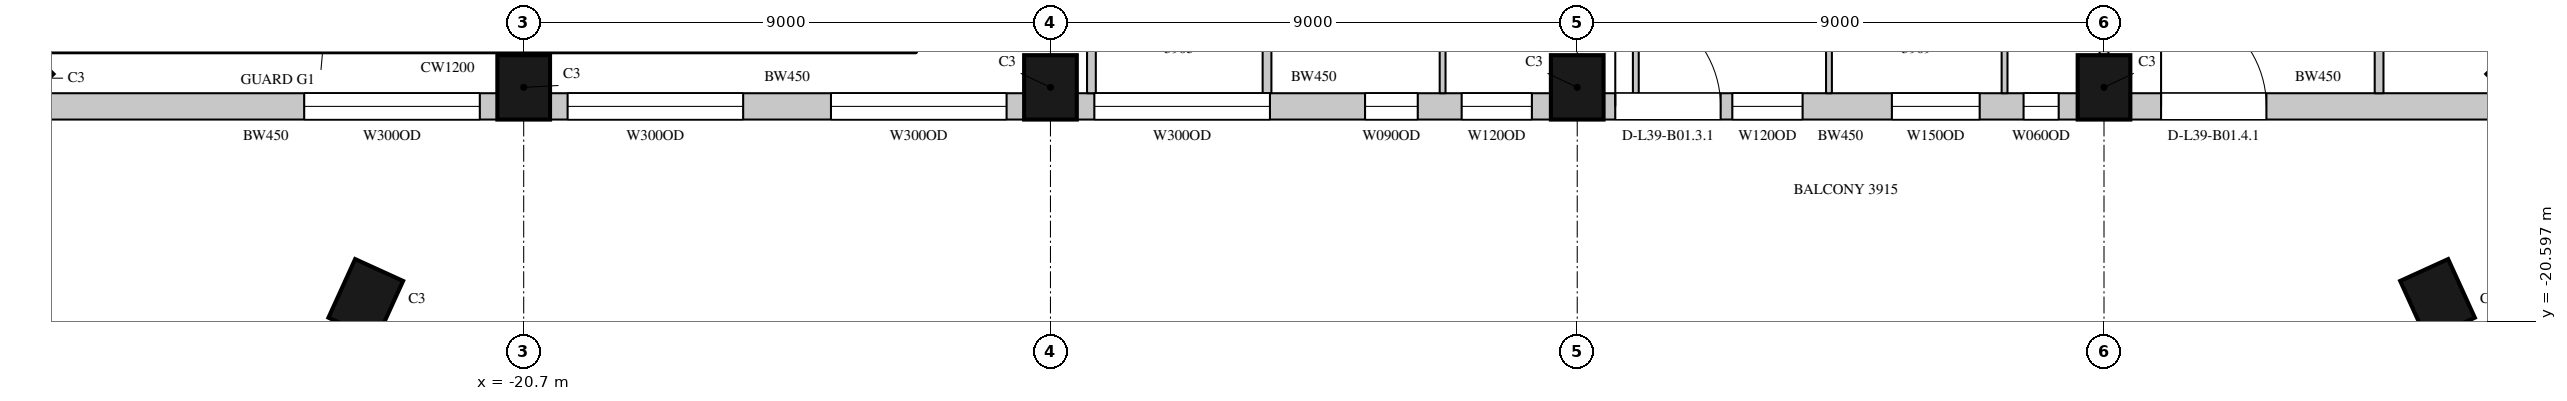
"""IFC4 building model, lengths in metres.
Left out: names, types, materials, properties, quantities, classifications, styles, units other than length and angle.
Written with IfcOpenShell. Run it as: python <this file> out.ifc"""

import sys

from ifc_helpers import new_model, si_unit, direction, frame, frame_2d, origin, origin_2d, place, context, subcontext, project, spatial, rectangle, extrude, element, fill, save


model = new_model("IFC4")
c1 = context("Model", 3, precision=1e-05, world=origin(), true_north=direction((0.0, 1.0)))
c2 = subcontext(c1, "Body", "Model", "MODEL_VIEW")
j1 = project(units=[si_unit("LENGTHUNIT", "METRE"), si_unit("PLANEANGLEUNIT", "RADIAN")], contexts=[c1])
p1 = place(None, origin())
s1 = spatial("IfcSite", under=j1, at=p1, CompositionType="ELEMENT")
p2 = place(p1, origin())
s2 = spatial("IfcBuilding", under=s1, at=p2, CompositionType="ELEMENT")
p3 = place(p2, frame((0.0, 0.0, 181.0)))
s3 = spatial("IfcBuildingStorey", under=s2, at=p3, CompositionType="ELEMENT", Elevation=181.0)
for number, where, z_axis, x_axis in (
    (1, (-29.443, -16.443, 0.0), (0.0, 0.0, 1.0), (0.707, -0.707, 0.0)),
    (2, (-20.7, -16.6, 0.0), (0.0, 0.0, 1.0), (1.0, 0.0, 0.0)),
    (3, (-11.7, -16.6, 0.0), (0.0, 0.0, 1.0), (1.0, 0.0, 0.0)),
    (4, (-2.7, -16.6, 0.0), (0.0, 0.0, 1.0), (1.0, 0.0, 0.0)),
    (5, (6.3, -16.6, 0.0), (0.0, 0.0, 1.0), (1.0, 0.0, 0.0)),
    (6, (13.543, -16.443, 0.0), (0.0, 0.0, 1.0), (0.707, 0.707, 0.0)),
    (7, (-23.398, -20.221, 0.0), (0.0, 0.0, 1.0), (0.91, -0.415, 0.0)),
    (8, (11.998, -20.221, 0.0), (0.0, 0.0, 1.0), (0.91, 0.415, 0.0)),
):
    element("IfcColumn", number, at=place(p3, frame(where, z_axis=z_axis, x_axis=x_axis)), inside=s3, PredefinedType="COLUMN", context=c2, shape_type="SweptSolid", body=[
        extrude(rectangle(XDim=0.9, YDim=1.1, at=origin_2d()), origin(), (0.0, 0.0, 1.0), 4.1),
    ])
p4 = place(p3, frame((-29.064, -16.925, 0.0), z_axis=(0.0, 0.0, 1.0), x_axis=(1.0, 0.0, 0.0)))
e9 = element("IfcWall", 9, at=p4, inside=s3, PredefinedType="SOLIDWALL", context=c2, shape_type="SweptSolid", body=[
    extrude(rectangle(XDim=7.914, YDim=0.45, at=frame_2d((3.957, 0.0))), origin(), (0.0, 0.0, 1.0), 3.8),
])
p5 = place(p4, frame((4.614, 0.0, 1.05)))
e10 = element("IfcOpeningElement", 10, at=p5, cuts=e9, PredefinedType="OPENING", context=c2, shape_type="SweptSolid", body=[
    extrude(rectangle(XDim=3.0, YDim=2.4, at=frame_2d((1.5, 1.2))), frame((0.0, 0.235, 0.0), z_axis=(0.0, -1.0, 0.0), x_axis=(1.0, 0.0, 0.0)), (0.0, 0.0, 1.0), 0.47),
])
p6 = place(p3, frame((-20.25, -16.925, 0.0), z_axis=(0.0, 0.0, 1.0), x_axis=(1.0, 0.0, 0.0)))
e11 = element("IfcWall", 11, at=p6, inside=s3, PredefinedType="SOLIDWALL", context=c2, shape_type="SweptSolid", body=[
    extrude(rectangle(XDim=8.1, YDim=0.45, at=frame_2d((4.05, 0.0))), origin(), (0.0, 0.0, 1.0), 3.8),
])
p7 = place(p6, frame((0.3, 0.0, 1.05)))
e12 = element("IfcOpeningElement", 12, at=p7, cuts=e11, PredefinedType="OPENING", context=c2, shape_type="SweptSolid", body=[
    extrude(rectangle(XDim=3.0, YDim=2.4, at=frame_2d((1.5, 1.2))), frame((0.0, 0.235, 0.0), z_axis=(0.0, -1.0, 0.0), x_axis=(1.0, 0.0, 0.0)), (0.0, 0.0, 1.0), 0.47),
])
p8 = place(p6, frame((4.8, 0.0, 1.05)))
e13 = element("IfcOpeningElement", 13, at=p8, cuts=e11, PredefinedType="OPENING", context=c2, shape_type="SweptSolid", body=[
    extrude(rectangle(XDim=3.0, YDim=2.4, at=frame_2d((1.5, 1.2))), frame((0.0, 0.235, 0.0), z_axis=(0.0, -1.0, 0.0), x_axis=(1.0, 0.0, 0.0)), (0.0, 0.0, 1.0), 0.47),
])
p9 = place(p3, frame((-11.25, -16.925, 0.0), z_axis=(0.0, 0.0, 1.0), x_axis=(1.0, 0.0, 0.0)))
e14 = element("IfcWall", 14, at=p9, inside=s3, PredefinedType="SOLIDWALL", context=c2, shape_type="SweptSolid", body=[
    extrude(rectangle(XDim=8.1, YDim=0.45, at=frame_2d((4.05, 0.0))), origin(), (0.0, 0.0, 1.0), 3.8),
])
p10 = place(p9, frame((0.3, 0.0, 1.05)))
e15 = element("IfcOpeningElement", 15, at=p10, cuts=e14, PredefinedType="OPENING", context=c2, shape_type="SweptSolid", body=[
    extrude(rectangle(XDim=3.0, YDim=2.4, at=frame_2d((1.5, 1.2))), frame((0.0, 0.235, 0.0), z_axis=(0.0, -1.0, 0.0), x_axis=(1.0, 0.0, 0.0)), (0.0, 0.0, 1.0), 0.47),
])
p11 = place(p9, frame((4.925, 0.0, 1.05)))
e16 = element("IfcOpeningElement", 16, at=p11, cuts=e14, PredefinedType="OPENING", context=c2, shape_type="SweptSolid", body=[
    extrude(rectangle(XDim=0.9, YDim=2.4, at=frame_2d((0.45, 1.2))), frame((0.0, 0.235, 0.0), z_axis=(0.0, -1.0, 0.0), x_axis=(1.0, 0.0, 0.0)), (0.0, 0.0, 1.0), 0.47),
])
p12 = place(p9, frame((6.575, 0.0, 1.05)))
e17 = element("IfcOpeningElement", 17, at=p12, cuts=e14, PredefinedType="OPENING", context=c2, shape_type="SweptSolid", body=[
    extrude(rectangle(XDim=1.2, YDim=2.4, at=frame_2d((0.6, 1.2))), frame((0.0, 0.235, 0.0), z_axis=(0.0, -1.0, 0.0), x_axis=(1.0, 0.0, 0.0)), (0.0, 0.0, 1.0), 0.47),
])
p13 = place(p3, frame((-2.25, -16.925, 0.0), z_axis=(0.0, 0.0, 1.0), x_axis=(1.0, 0.0, 0.0)))
e18 = element("IfcWall", 18, at=p13, inside=s3, PredefinedType="SOLIDWALL", context=c2, shape_type="SweptSolid", body=[
    extrude(rectangle(XDim=8.1, YDim=0.45, at=frame_2d((4.05, 0.0))), origin(), (0.0, 0.0, 1.0), 3.8),
])
p14 = place(p13, frame((0.2, 0.0, 0.0)))
e19 = element("IfcOpeningElement", 19, at=p14, cuts=e18, PredefinedType="OPENING", context=c2, shape_type="SweptSolid", body=[
    extrude(rectangle(XDim=1.8, YDim=2.4, at=frame_2d((0.9, 1.2))), frame((0.0, 0.235, 0.0), z_axis=(0.0, -1.0, 0.0), x_axis=(1.0, 0.0, 0.0)), (0.0, 0.0, 1.0), 0.47),
])
p15 = place(p13, frame((2.2, 0.0, 1.05)))
e20 = element("IfcOpeningElement", 20, at=p15, cuts=e18, PredefinedType="OPENING", context=c2, shape_type="SweptSolid", body=[
    extrude(rectangle(XDim=1.2, YDim=2.4, at=frame_2d((0.6, 1.2))), frame((0.0, 0.235, 0.0), z_axis=(0.0, -1.0, 0.0), x_axis=(1.0, 0.0, 0.0)), (0.0, 0.0, 1.0), 0.47),
])
p16 = place(p13, frame((4.926, 0.0, 1.05)))
e21 = element("IfcOpeningElement", 21, at=p16, cuts=e18, PredefinedType="OPENING", context=c2, shape_type="SweptSolid", body=[
    extrude(rectangle(XDim=1.5, YDim=2.4, at=frame_2d((0.75, 1.2))), frame((0.0, 0.235, 0.0), z_axis=(0.0, -1.0, 0.0), x_axis=(1.0, 0.0, 0.0)), (0.0, 0.0, 1.0), 0.47),
])
p17 = place(p13, frame((7.176, 0.0, 1.05)))
e22 = element("IfcOpeningElement", 22, at=p17, cuts=e18, PredefinedType="OPENING", context=c2, shape_type="SweptSolid", body=[
    extrude(rectangle(XDim=0.6, YDim=2.4, at=frame_2d((0.3, 1.2))), frame((0.0, 0.235, 0.0), z_axis=(0.0, -1.0, 0.0), x_axis=(1.0, 0.0, 0.0)), (0.0, 0.0, 1.0), 0.47),
])
p18 = place(p3, frame((6.75, -16.925, 0.0), z_axis=(0.0, 0.0, 1.0), x_axis=(1.0, 0.0, 0.0)))
e23 = element("IfcWall", 23, at=p18, inside=s3, PredefinedType="SOLIDWALL", context=c2, shape_type="SweptSolid", body=[
    extrude(rectangle(XDim=6.414, YDim=0.45, at=frame_2d((3.207, 0.0))), origin(), (0.0, 0.0, 1.0), 3.8),
])
p19 = place(p18, frame((0.525, 0.0, 0.0)))
e24 = element("IfcOpeningElement", 24, at=p19, cuts=e23, PredefinedType="OPENING", context=c2, shape_type="SweptSolid", body=[
    extrude(rectangle(XDim=1.8, YDim=2.4, at=frame_2d((0.9, 1.2))), frame((0.0, 0.235, 0.0), z_axis=(0.0, -1.0, 0.0), x_axis=(1.0, 0.0, 0.0)), (0.0, 0.0, 1.0), 0.47),
])
for number, where, z_axis, x_axis in (
    (25, (-19.73, -18.0, 0.0), (0.0, 0.0, 1.0), (1.0, 0.0, 0.0)),
    (26, (-15.77, -18.0, 0.0), (0.0, 0.0, 1.0), (1.0, 0.0, 0.0)),
    (27, (0.07, -18.0, 0.0), (0.0, 0.0, 1.0), (1.0, 0.0, 0.0)),
):
    element("IfcWall", number, at=place(p3, frame(where, z_axis=z_axis, x_axis=x_axis)), inside=s3, PredefinedType="SOLIDWALL", context=c2, shape_type="SweptSolid", body=[
        extrude(rectangle(XDim=3.76, YDim=0.45, at=frame_2d((1.88, 0.0))), origin(), (0.0, 0.0, 1.0), 0.6),
    ])
p20 = place(p3, frame((-11.0, -16.7, 0.0), z_axis=(0.0, 0.0, 1.0), x_axis=(0.0, 1.0, 0.0)))
e28 = element("IfcWall", 28, at=p20, inside=s3, PredefinedType="PARTITIONING", context=c2, shape_type="SweptSolid", body=[
    extrude(rectangle(XDim=1.88, YDim=0.15, at=frame_2d((0.94, 0.0))), origin(), (0.0, 0.0, 1.0), 3.8),
])
p21 = place(p3, frame((-8.0, -16.7, 0.0), z_axis=(0.0, 0.0, 1.0), x_axis=(0.0, 1.0, 0.0)))
e29 = element("IfcWall", 29, at=p21, inside=s3, PredefinedType="PARTITIONING", context=c2, shape_type="SweptSolid", body=[
    extrude(rectangle(XDim=4.6, YDim=0.15, at=frame_2d((2.3, 0.0))), origin(), (0.0, 0.0, 1.0), 3.8),
])
p22 = place(p3, frame((6.3, -16.05, 0.0), z_axis=(0.0, 0.0, 1.0), x_axis=(0.0, 1.0, 0.0)))
e30 = element("IfcWall", 30, at=p22, inside=s3, PredefinedType="PARTITIONING", context=c2, shape_type="SweptSolid", body=[
    extrude(rectangle(XDim=3.95, YDim=0.15, at=frame_2d((1.975, 0.0))), origin(), (0.0, 0.0, 1.0), 3.25),
])
p23 = place(p3, frame((11.0, -16.7, 0.0), z_axis=(0.0, 0.0, 1.0), x_axis=(0.0, 1.0, 0.0)))
e31 = element("IfcWall", 31, at=p23, inside=s3, PredefinedType="PARTITIONING", context=c2, shape_type="SweptSolid", body=[
    extrude(rectangle(XDim=4.7, YDim=0.15, at=frame_2d((2.35, 0.0))), origin(), (0.0, 0.0, 1.0), 3.8),
])
for number, where, z_axis, x_axis in (
    (32, (-5.0, -16.7, 0.0), (0.0, 0.0, 1.0), (0.0, 1.0, 0.0)),
    (33, (-1.699, -16.7, 0.0), (0.0, 0.0, 1.0), (0.0, 1.0, 0.0)),
):
    element("IfcWall", number, at=place(p3, frame(where, z_axis=z_axis, x_axis=x_axis)), inside=s3, PredefinedType="PARTITIONING", context=c2, shape_type="SweptSolid", body=[
        extrude(rectangle(XDim=4.6, YDim=0.1, at=frame_2d((2.3, 0.0))), origin(), (0.0, 0.0, 1.0), 3.8),
    ])
p24 = place(p3, frame((1.601, -16.7, 0.0), z_axis=(0.0, 0.0, 1.0), x_axis=(0.0, 1.0, 0.0)))
e34 = element("IfcWall", 34, at=p24, inside=s3, PredefinedType="PARTITIONING", context=c2, shape_type="SweptSolid", body=[
    extrude(rectangle(XDim=4.6, YDim=0.1, at=frame_2d((2.3, 0.0))), origin(), (0.0, 0.0, 1.0), 3.15),
])
p25 = place(p3, frame((4.601, -16.7, 0.0), z_axis=(0.0, 0.0, 1.0), x_axis=(0.0, 1.0, 0.0)))
e35 = element("IfcWall", 35, at=p25, inside=s3, PredefinedType="PARTITIONING", context=c2, shape_type="SweptSolid", body=[
    extrude(rectangle(XDim=4.6, YDim=0.1, at=frame_2d((2.3, 0.0))), origin(), (0.0, 0.0, 1.0), 3.8),
])
p26 = place(p5, origin())
e36 = element("IfcWindow", 36, at=p26, inside=s3, PartitioningType="SINGLE_PANEL", PredefinedType="WINDOW", context=c2, shape_type="SweptSolid", body=[
    extrude(rectangle(XDim=3.0, YDim=2.4, at=frame_2d((1.5, 1.2))), frame((0.0, 0.135, 0.0), z_axis=(0.0, -1.0, 0.0), x_axis=(1.0, 0.0, 0.0)), (0.0, 0.0, 1.0), 0.06),
])
fill(e10, e36)
p27 = place(p7, origin())
e37 = element("IfcWindow", 37, at=p27, inside=s3, PartitioningType="SINGLE_PANEL", PredefinedType="WINDOW", context=c2, shape_type="SweptSolid", body=[
    extrude(rectangle(XDim=3.0, YDim=2.4, at=frame_2d((1.5, 1.2))), frame((0.0, 0.135, 0.0), z_axis=(0.0, -1.0, 0.0), x_axis=(1.0, 0.0, 0.0)), (0.0, 0.0, 1.0), 0.06),
])
fill(e12, e37)
p28 = place(p8, origin())
e38 = element("IfcWindow", 38, at=p28, inside=s3, PartitioningType="SINGLE_PANEL", PredefinedType="WINDOW", context=c2, shape_type="SweptSolid", body=[
    extrude(rectangle(XDim=3.0, YDim=2.4, at=frame_2d((1.5, 1.2))), frame((0.0, 0.135, 0.0), z_axis=(0.0, -1.0, 0.0), x_axis=(1.0, 0.0, 0.0)), (0.0, 0.0, 1.0), 0.06),
])
fill(e13, e38)
p29 = place(p10, origin())
e39 = element("IfcWindow", 39, at=p29, inside=s3, PartitioningType="SINGLE_PANEL", PredefinedType="WINDOW", context=c2, shape_type="SweptSolid", body=[
    extrude(rectangle(XDim=3.0, YDim=2.4, at=frame_2d((1.5, 1.2))), frame((0.0, 0.135, 0.0), z_axis=(0.0, -1.0, 0.0), x_axis=(1.0, 0.0, 0.0)), (0.0, 0.0, 1.0), 0.06),
])
fill(e15, e39)
p30 = place(p14, origin())
e40 = element("IfcDoor", 40, at=p30, inside=s3, OperationType="SLIDING_TO_LEFT", PredefinedType="DOOR", context=c2, shape_type="SweptSolid", body=[
    extrude(rectangle(XDim=1.8, YDim=2.4, at=frame_2d((0.9, 1.2))), frame((0.0, 0.13, 0.0), z_axis=(0.0, -1.0, 0.0), x_axis=(1.0, 0.0, 0.0)), (0.0, 0.0, 1.0), 0.05),
])
fill(e19, e40)
p31 = place(p15, origin())
e41 = element("IfcWindow", 41, at=p31, inside=s3, PartitioningType="SINGLE_PANEL", PredefinedType="WINDOW", context=c2, shape_type="SweptSolid", body=[
    extrude(rectangle(XDim=1.2, YDim=2.4, at=frame_2d((0.6, 1.2))), frame((0.0, 0.135, 0.0), z_axis=(0.0, -1.0, 0.0), x_axis=(1.0, 0.0, 0.0)), (0.0, 0.0, 1.0), 0.06),
])
fill(e20, e41)
p32 = place(p19, origin())
e42 = element("IfcDoor", 42, at=p32, inside=s3, OperationType="SLIDING_TO_LEFT", PredefinedType="DOOR", context=c2, shape_type="SweptSolid", body=[
    extrude(rectangle(XDim=1.8, YDim=2.4, at=frame_2d((0.9, 1.2))), frame((0.0, 0.13, 0.0), z_axis=(0.0, -1.0, 0.0), x_axis=(1.0, 0.0, 0.0)), (0.0, 0.0, 1.0), 0.05),
])
fill(e24, e42)
p33 = place(p11, origin())
e43 = element("IfcWindow", 43, at=p33, inside=s3, PartitioningType="SINGLE_PANEL", PredefinedType="WINDOW", context=c2, shape_type="SweptSolid", body=[
    extrude(rectangle(XDim=0.9, YDim=2.4, at=frame_2d((0.45, 1.2))), frame((0.0, 0.135, 0.0), z_axis=(0.0, -1.0, 0.0), x_axis=(1.0, 0.0, 0.0)), (0.0, 0.0, 1.0), 0.06),
])
fill(e16, e43)
p34 = place(p12, origin())
e44 = element("IfcWindow", 44, at=p34, inside=s3, PartitioningType="SINGLE_PANEL", PredefinedType="WINDOW", context=c2, shape_type="SweptSolid", body=[
    extrude(rectangle(XDim=1.2, YDim=2.4, at=frame_2d((0.6, 1.2))), frame((0.0, 0.135, 0.0), z_axis=(0.0, -1.0, 0.0), x_axis=(1.0, 0.0, 0.0)), (0.0, 0.0, 1.0), 0.06),
])
fill(e17, e44)
p35 = place(p16, origin())
e45 = element("IfcWindow", 45, at=p35, inside=s3, PartitioningType="SINGLE_PANEL", PredefinedType="WINDOW", context=c2, shape_type="SweptSolid", body=[
    extrude(rectangle(XDim=1.5, YDim=2.4, at=frame_2d((0.75, 1.2))), frame((0.0, 0.135, 0.0), z_axis=(0.0, -1.0, 0.0), x_axis=(1.0, 0.0, 0.0)), (0.0, 0.0, 1.0), 0.06),
])
fill(e21, e45)
p36 = place(p17, origin())
e46 = element("IfcWindow", 46, at=p36, inside=s3, PartitioningType="SINGLE_PANEL", PredefinedType="WINDOW", context=c2, shape_type="SweptSolid", body=[
    extrude(rectangle(XDim=0.6, YDim=2.4, at=frame_2d((0.3, 1.2))), frame((0.0, 0.135, 0.0), z_axis=(0.0, -1.0, 0.0), x_axis=(1.0, 0.0, 0.0)), (0.0, 0.0, 1.0), 0.06),
])
fill(e22, e46)
save(model, sys.argv[1])
